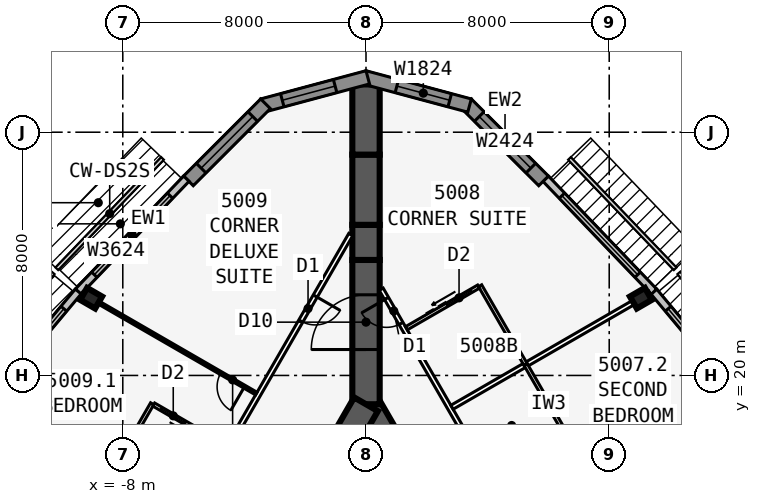
"""IFC4 building model, lengths in metres.
Left out: names, types, materials, properties, quantities, classifications, styles, units other than length and angle.
Written with IfcOpenShell. Run it as: python <this file> out.ifc"""

import sys

from ifc_helpers import new_model, si_unit, direction, frame, frame_2d, origin, origin_2d, place, context, subcontext, project, spatial, polyline, rectangle, i_section, outline, extrude, element, fill, save


model = new_model("IFC4")
c1 = context("Model", 3, precision=1e-05, world=origin(), true_north=direction((0.0, 1.0)))
c2 = subcontext(c1, "Body", "Model", "MODEL_VIEW")
j1 = project(units=[si_unit("LENGTHUNIT", "METRE"), si_unit("PLANEANGLEUNIT", "RADIAN")], contexts=[c1])
p1 = place(None, origin())
s1 = spatial("IfcSite", under=j1, at=p1, CompositionType="ELEMENT")
p2 = place(p1, origin())
s2 = spatial("IfcBuilding", under=s1, at=p2, CompositionType="ELEMENT")
p3 = place(p2, frame((0.0, 0.0, 186.1)))
s3 = spatial("IfcBuildingStorey", under=s2, at=p3, CompositionType="ELEMENT", Elevation=186.1)
p4 = place(p3, frame((16.5, -9.526, 0.0), z_axis=(0.0, 0.0, 1.0), x_axis=(-0.499999749417, 0.866025548458, 0.0)))
e1 = element("IfcWall", 1, at=p4, inside=s3, PredefinedType="SHEAR", context=c2, shape_type="SweptSolid", body=[
    extrude(rectangle(XDim=33.0, YDim=0.9, at=frame_2d((16.5, 0.0))), origin(), (0.0, 0.0, 1.0), 3.4),
])
p5 = place(p4, frame((14.15, 0.0, 0.0)))
e2 = element("IfcOpeningElement", 2, at=p5, cuts=e1, PredefinedType="OPENING", context=c2, shape_type="SweptSolid", body=[
    extrude(rectangle(XDim=1.8, YDim=2.13, at=frame_2d((0.9, 1.065))), frame((0.0, 0.46, 0.0), z_axis=(0.0, -1.0, 0.0), x_axis=(1.0, 0.0, 0.0)), (0.0, 0.0, 1.0), 0.92),
])
p6 = place(p4, frame((12.6, 0.0, 0.0)))
e3 = element("IfcOpeningElement", 3, at=p6, cuts=e1, PredefinedType="OPENING", context=c2, shape_type="SweptSolid", body=[
    extrude(rectangle(XDim=1.0, YDim=2.13, at=frame_2d((0.5, 1.065))), frame((0.0, 0.46, 0.0), z_axis=(0.0, -1.0, 0.0), x_axis=(1.0, 0.0, 0.0)), (0.0, 0.0, 1.0), 0.92),
])
p7 = place(p3, frame((0.0, 19.052, 0.0), z_axis=(0.0, 0.0, 1.0), x_axis=(-0.499999749417, -0.866025548458, 0.0)))
e4 = element("IfcWall", 4, at=p7, inside=s3, PredefinedType="SHEAR", context=c2, shape_type="SweptSolid", body=[
    extrude(rectangle(XDim=33.0, YDim=0.9, at=frame_2d((16.5, 0.0))), origin(), (0.0, 0.0, 1.0), 3.4),
])
p8 = place(p7, frame((14.15, 0.0, 0.0)))
e5 = element("IfcOpeningElement", 5, at=p8, cuts=e4, PredefinedType="OPENING", context=c2, shape_type="SweptSolid", body=[
    extrude(rectangle(XDim=1.8, YDim=2.13, at=frame_2d((0.9, 1.065))), frame((0.0, 0.46, 0.0), z_axis=(0.0, -1.0, 0.0), x_axis=(1.0, 0.0, 0.0)), (0.0, 0.0, 1.0), 0.92),
])
p9 = place(p7, frame((12.6, 0.0, 0.0)))
e6 = element("IfcOpeningElement", 6, at=p9, cuts=e4, PredefinedType="OPENING", context=c2, shape_type="SweptSolid", body=[
    extrude(rectangle(XDim=1.0, YDim=2.13, at=frame_2d((0.5, 1.065))), frame((0.0, 0.46, 0.0), z_axis=(0.0, -1.0, 0.0), x_axis=(1.0, 0.0, 0.0)), (0.0, 0.0, 1.0), 0.92),
])
p10 = place(p3, frame((0.0, 19.052, 0.0), z_axis=(0.0, 0.0, 1.0), x_axis=(0.0, 1.0, 0.0)))
e7 = element("IfcWall", 7, at=p10, inside=s3, PredefinedType="SHEAR", context=c2, shape_type="SweptSolid", body=[
    extrude(rectangle(XDim=4.746, YDim=0.9, at=frame_2d((2.373, 0.0))), origin(), (0.0, 0.0, 1.0), 3.4),
])
p11 = place(p10, frame((1.8, 0.0, 0.0)))
e8 = element("IfcOpeningElement", 8, at=p11, cuts=e7, PredefinedType="OPENING", context=c2, shape_type="SweptSolid", body=[
    extrude(rectangle(XDim=1.8, YDim=2.13, at=frame_2d((0.9, 1.065))), frame((0.0, 0.46, 0.0), z_axis=(0.0, -1.0, 0.0), x_axis=(1.0, 0.0, 0.0)), (0.0, 0.0, 1.0), 0.92),
])
p12 = place(p3, frame((0.0, 23.799, 0.0), z_axis=(0.0, 0.0, 1.0), x_axis=(0.0, 1.0, 0.0)))
e9 = element("IfcWall", 9, at=p12, inside=s3, PredefinedType="SHEAR", context=c2, shape_type="SweptSolid", body=[
    extrude(rectangle(XDim=1.155, YDim=0.9, at=frame_2d((0.577, 0.0))), origin(), (0.0, 0.0, 1.0), 3.4),
])
p13 = place(p3, frame((0.0, 24.953, 0.0), z_axis=(0.0, 0.0, 1.0), x_axis=(0.0, 1.0, 0.0)))
e10 = element("IfcWall", 10, at=p13, inside=s3, PredefinedType="SHEAR", context=c2, shape_type="SweptSolid", body=[
    extrude(rectangle(XDim=2.309, YDim=0.9, at=frame_2d((1.155, 0.0))), origin(), (0.0, 0.0, 1.0), 3.4),
])
p14 = place(p3, frame((0.0, 27.263, 0.0), z_axis=(0.0, 0.0, 1.0), x_axis=(0.0, 1.0, 0.0)))
e11 = element("IfcWall", 11, at=p14, inside=s3, PredefinedType="SHEAR", context=c2, shape_type="SweptSolid", body=[
    extrude(rectangle(XDim=2.31, YDim=0.9, at=frame_2d((1.155, 0.0))), origin(), (0.0, 0.0, 1.0), 3.4),
])
for number, where, z_axis, x_axis in (
    (12, (9.041, 22.541, 0.0), (0.0, 0.0, 1.0), (-0.5, 0.866, 0.0)),
    (13, (-9.041, 22.541, 0.0), (0.0, 0.0, 1.0), (-0.5, -0.866, 0.0)),
):
    element("IfcColumn", number, at=place(p3, frame(where, z_axis=z_axis, x_axis=x_axis)), inside=s3, PredefinedType="COLUMN", context=c2, shape_type="SweptSolid", body=[
        extrude(i_section(OverallWidth=0.455, OverallDepth=0.569, WebThickness=0.078, FlangeThickness=0.125, at=origin_2d()), origin(), (0.0, 0.0, 1.0), 3.4),
    ])
p15 = place(p3, frame((12.723, 18.868, 0.0), z_axis=(0.0, 0.0, 1.0), x_axis=(-0.641810386606, 0.766863369607, 0.0)))
e14 = element("IfcWall", 14, at=p15, inside=s3, PredefinedType="STANDARD", context=c2, shape_type="SweptSolid", body=[
    extrude(rectangle(XDim=5.076, YDim=0.25, at=frame_2d((2.538, 0.0))), origin(), (0.0, 0.0, 1.0), 3.15),
])
p16 = place(p15, frame((0.738, 0.0, 0.45)))
e15 = element("IfcOpeningElement", 15, at=p16, cuts=e14, PredefinedType="OPENING", context=c2, shape_type="SweptSolid", body=[
    extrude(rectangle(XDim=3.6, YDim=2.4, at=frame_2d((1.8, 1.2))), frame((0.0, 0.135, 0.0), z_axis=(0.0, -1.0, 0.0), x_axis=(1.0, 0.0, 0.0)), (0.0, 0.0, 1.0), 0.27),
])
p17 = place(p3, frame((9.471, 22.754, 0.0), z_axis=(0.0, 0.0, 1.0), x_axis=(-0.691719937936, 0.722165858693, 0.0)))
e16 = element("IfcWall", 16, at=p17, inside=s3, PredefinedType="STANDARD", context=c2, shape_type="SweptSolid", body=[
    extrude(rectangle(XDim=5.148, YDim=0.25, at=frame_2d((2.574, 0.0))), origin(), (0.0, 0.0, 1.0), 3.15),
])
p18 = place(p17, frame((0.774, 0.0, 0.45)))
e17 = element("IfcOpeningElement", 17, at=p18, cuts=e16, PredefinedType="OPENING", context=c2, shape_type="SweptSolid", body=[
    extrude(rectangle(XDim=3.6, YDim=2.4, at=frame_2d((1.8, 1.2))), frame((0.0, 0.135, 0.0), z_axis=(0.0, -1.0, 0.0), x_axis=(1.0, 0.0, 0.0)), (0.0, 0.0, 1.0), 0.27),
])
p19 = place(p3, frame((5.841, 26.399, 0.0), z_axis=(0.0, 0.0, 1.0), x_axis=(-0.707106781187, 0.707106781187, 0.0)))
e18 = element("IfcWall", 18, at=p19, inside=s3, PredefinedType="SOLIDWALL", context=c2, shape_type="SweptSolid", body=[
    extrude(rectangle(XDim=3.586, YDim=0.45, at=frame_2d((1.793, 0.0))), origin(), (0.0, 0.0, 1.0), 3.15),
])
p20 = place(p19, frame((0.593, 0.0, 0.45)))
e19 = element("IfcOpeningElement", 19, at=p20, cuts=e18, PredefinedType="OPENING", context=c2, shape_type="SweptSolid", body=[
    extrude(rectangle(XDim=2.4, YDim=2.4, at=frame_2d((1.2, 1.2))), frame((0.0, 0.235, 0.0), z_axis=(0.0, -1.0, 0.0), x_axis=(1.0, 0.0, 0.0)), (0.0, 0.0, 1.0), 0.47),
])
p21 = place(p3, frame((3.406, 28.877, 0.0), z_axis=(0.0, 0.0, 1.0), x_axis=(-0.965924653531, 0.258823421857, 0.0)))
e20 = element("IfcWall", 20, at=p21, inside=s3, PredefinedType="SOLIDWALL", context=c2, shape_type="SweptSolid", body=[
    extrude(outline(polyline([(3.586, 0.225), (3.527, 0.225), (3.035, 0.093), (3.0, 0.225), (0.0, 0.225), (0.0, -0.225), (3.586, -0.225), (3.586, 0.225)])), origin(), (0.0, 0.0, 1.0), 3.15),
])
p22 = place(p21, frame((0.675, 0.0, 0.45)))
e21 = element("IfcOpeningElement", 21, at=p22, cuts=e20, PredefinedType="OPENING", context=c2, shape_type="SweptSolid", body=[
    extrude(rectangle(XDim=1.8, YDim=2.4, at=frame_2d((0.9, 1.2))), frame((0.0, 0.235, 0.0), z_axis=(0.0, -1.0, 0.0), x_axis=(1.0, 0.0, 0.0)), (0.0, 0.0, 1.0), 0.47),
])
p23 = place(p3, frame((0.058, 29.805, 0.0), z_axis=(0.0, 0.0, 1.0), x_axis=(-0.965924653531, -0.258823421857, 0.0)))
e22 = element("IfcWall", 22, at=p23, inside=s3, PredefinedType="SOLIDWALL", context=c2, shape_type="SweptSolid", body=[
    extrude(outline(polyline([(3.586, 0.225), (0.586, 0.225), (0.551, 0.093), (0.06, 0.225), (0.0, 0.225), (0.0, -0.225), (3.586, -0.225), (3.586, 0.225)])), origin(), (0.0, 0.0, 1.0), 3.15),
])
p24 = place(p23, frame((1.111, 0.0, 0.45)))
e23 = element("IfcOpeningElement", 23, at=p24, cuts=e22, PredefinedType="OPENING", context=c2, shape_type="SweptSolid", body=[
    extrude(rectangle(XDim=1.8, YDim=2.4, at=frame_2d((0.9, 1.2))), frame((0.0, 0.235, 0.0), z_axis=(0.0, -1.0, 0.0), x_axis=(1.0, 0.0, 0.0)), (0.0, 0.0, 1.0), 0.47),
])
p25 = place(p3, frame((-3.305, 28.935, 0.0), z_axis=(0.0, 0.0, 1.0), x_axis=(-0.707106781187, -0.707106781187, 0.0)))
e24 = element("IfcWall", 24, at=p25, inside=s3, PredefinedType="SOLIDWALL", context=c2, shape_type="SweptSolid", body=[
    extrude(rectangle(XDim=3.586, YDim=0.45, at=frame_2d((1.793, 0.0))), origin(), (0.0, 0.0, 1.0), 3.15),
])
p26 = place(p25, frame((0.593, 0.0, 0.45)))
e25 = element("IfcOpeningElement", 25, at=p26, cuts=e24, PredefinedType="OPENING", context=c2, shape_type="SweptSolid", body=[
    extrude(rectangle(XDim=2.4, YDim=2.4, at=frame_2d((1.2, 1.2))), frame((0.0, 0.235, 0.0), z_axis=(0.0, -1.0, 0.0), x_axis=(1.0, 0.0, 0.0)), (0.0, 0.0, 1.0), 0.47),
])
p27 = place(p3, frame((-5.91, 26.472, 0.0), z_axis=(0.0, 0.0, 1.0), x_axis=(-0.691719937936, -0.722165858693, 0.0)))
e26 = element("IfcWall", 26, at=p27, inside=s3, PredefinedType="STANDARD", context=c2, shape_type="SweptSolid", body=[
    extrude(rectangle(XDim=5.148, YDim=0.25, at=frame_2d((2.574, 0.0))), origin(), (0.0, 0.0, 1.0), 3.15),
])
p28 = place(p27, frame((0.774, 0.0, 0.45)))
e27 = element("IfcOpeningElement", 27, at=p28, cuts=e26, PredefinedType="OPENING", context=c2, shape_type="SweptSolid", body=[
    extrude(rectangle(XDim=3.6, YDim=2.4, at=frame_2d((1.8, 1.2))), frame((0.0, 0.135, 0.0), z_axis=(0.0, -1.0, 0.0), x_axis=(1.0, 0.0, 0.0)), (0.0, 0.0, 1.0), 0.27),
])
p29 = place(p3, frame((-9.465, 22.76, 0.0), z_axis=(0.0, 0.0, 1.0), x_axis=(-0.641810386606, -0.766863369607, 0.0)))
e28 = element("IfcWall", 28, at=p29, inside=s3, PredefinedType="STANDARD", context=c2, shape_type="SweptSolid", body=[
    extrude(rectangle(XDim=5.076, YDim=0.25, at=frame_2d((2.538, 0.0))), origin(), (0.0, 0.0, 1.0), 3.15),
])
p30 = place(p29, frame((0.738, 0.0, 0.45)))
e29 = element("IfcOpeningElement", 29, at=p30, cuts=e28, PredefinedType="OPENING", context=c2, shape_type="SweptSolid", body=[
    extrude(rectangle(XDim=3.6, YDim=2.4, at=frame_2d((1.8, 1.2))), frame((0.0, 0.135, 0.0), z_axis=(0.0, -1.0, 0.0), x_axis=(1.0, 0.0, 0.0)), (0.0, 0.0, 1.0), 0.27),
])
p31 = place(p3, frame((20.027, -10.985, 0.0), z_axis=(0.0, 0.0, 1.0), x_axis=(-0.500001677587, 0.866024435227, 0.0)))
e30 = element("IfcWall", 30, at=p31, inside=s3, PredefinedType="PARTITIONING", context=c2, shape_type="SweptSolid", body=[
    extrude(rectangle(XDim=39.054, YDim=0.15, at=frame_2d((19.527, 0.0))), origin(), (0.0, 0.0, 1.0), 3.15),
])
p32 = place(p31, frame((1.558, 0.0, 0.0)))
e31 = element("IfcOpeningElement", 31, at=p32, cuts=e30, PredefinedType="OPENING", context=c2, shape_type="SweptSolid", body=[
    extrude(rectangle(XDim=0.95, YDim=2.13, at=frame_2d((0.475, 1.065))), frame((0.0, 0.085, 0.0), z_axis=(0.0, -1.0, 0.0), x_axis=(1.0, 0.0, 0.0)), (0.0, 0.0, 1.0), 0.17),
])
p33 = place(p31, frame((12.752, 0.0, 0.0)))
e32 = element("IfcOpeningElement", 32, at=p33, cuts=e30, PredefinedType="OPENING", context=c2, shape_type="SweptSolid", body=[
    extrude(rectangle(XDim=0.95, YDim=2.13, at=frame_2d((0.475, 1.065))), frame((0.0, 0.085, 0.0), z_axis=(0.0, -1.0, 0.0), x_axis=(1.0, 0.0, 0.0)), (0.0, 0.0, 1.0), 0.17),
])
p34 = place(p31, frame((26.552, 0.0, 0.0)))
e33 = element("IfcOpeningElement", 33, at=p34, cuts=e30, PredefinedType="OPENING", context=c2, shape_type="SweptSolid", body=[
    extrude(rectangle(XDim=0.95, YDim=2.13, at=frame_2d((0.475, 1.065))), frame((0.0, 0.085, 0.0), z_axis=(0.0, -1.0, 0.0), x_axis=(1.0, 0.0, 0.0)), (0.0, 0.0, 1.0), 0.17),
])
p35 = place(p31, frame((37.752, 0.0, 0.0)))
e34 = element("IfcOpeningElement", 34, at=p35, cuts=e30, PredefinedType="OPENING", context=c2, shape_type="SweptSolid", body=[
    extrude(rectangle(XDim=0.95, YDim=2.13, at=frame_2d((0.475, 1.065))), frame((0.0, 0.085, 0.0), z_axis=(0.0, -1.0, 0.0), x_axis=(1.0, 0.0, 0.0)), (0.0, 0.0, 1.0), 0.17),
])
p36 = place(p3, frame((5.329, 14.623, 0.0), z_axis=(0.0, 0.0, 1.0), x_axis=(0.866011723728, 0.500023693804, 0.0)))
e35 = element("IfcWall", 35, at=p36, inside=s3, PredefinedType="PARTITIONING", context=c2, shape_type="SweptSolid", body=[
    extrude(rectangle(XDim=8.395, YDim=0.1, at=frame_2d((4.198, 0.0))), origin(), (0.0, 0.0, 1.0), 2.108),
])
p37 = place(p36, frame((0.45, 0.0, 0.0)))
e36 = element("IfcOpeningElement", 36, at=p37, cuts=e35, PredefinedType="OPENING", context=c2, shape_type="SweptSolid", body=[
    extrude(rectangle(XDim=0.9, YDim=2.032, at=frame_2d((0.45, 1.016))), frame((0.0, 0.06, 0.0), z_axis=(0.0, -1.0, 0.0), x_axis=(1.0, 0.0, 0.0)), (0.0, 0.0, 1.0), 0.12),
])
p38 = place(p3, frame((2.829, 18.954, 0.0), z_axis=(0.0, 0.0, 1.0), x_axis=(0.866015739374, 0.500016738876, 0.0)))
e37 = element("IfcWall", 37, at=p38, inside=s3, PredefinedType="PARTITIONING", context=c2, shape_type="SweptSolid", body=[
    extrude(rectangle(XDim=7.516, YDim=0.15, at=frame_2d((3.758, 0.0))), origin(), (0.0, 0.0, 1.0), 2.05),
])
for number, where, z_axis, x_axis in (
    (38, (6.753, 17.755, 0.0), (0.0, 0.0, 1.0), (-0.5, 0.866, 0.0)),
    (39, (5.253, 20.354, 0.0), (0.0, 0.0, 1.0), (-0.5, 0.866, 0.0)),
):
    element("IfcWall", number, at=place(p3, frame(where, z_axis=z_axis, x_axis=x_axis)), inside=s3, PredefinedType="PLUMBINGWALL", context=c2, shape_type="SweptSolid", body=[
        extrude(rectangle(XDim=3.0, YDim=0.12, at=frame_2d((1.5, 0.0))), origin(), (0.0, 0.0, 1.0), 3.15),
    ])
p39 = place(p3, frame((1.329, 21.552, 0.0), z_axis=(0.0, 0.0, 1.0), x_axis=(0.865997131366, 0.500048966069, 0.0)))
e40 = element("IfcWall", 40, at=p39, inside=s3, PredefinedType="PLUMBINGWALL", context=c2, shape_type="SweptSolid", body=[
    extrude(rectangle(XDim=2.74, YDim=0.12, at=frame_2d((1.37, 0.0))), origin(), (0.0, 0.0, 1.0), 3.15),
])
p40 = place(p39, frame((1.55, 0.0, 0.0)))
e41 = element("IfcOpeningElement", 41, at=p40, cuts=e40, PredefinedType="OPENING", context=c2, shape_type="SweptSolid", body=[
    extrude(rectangle(XDim=0.9, YDim=2.13, at=frame_2d((0.45, 1.065))), frame((0.0, 0.07, 0.0), z_axis=(0.0, -1.0, 0.0), x_axis=(1.0, 0.0, 0.0)), (0.0, 0.0, 1.0), 0.14),
])
p41 = place(p3, frame((-0.5, 24.636, 0.0), z_axis=(0.0, 0.0, 1.0), x_axis=(-0.500001915564, -0.86602429783, 0.0)))
e42 = element("IfcWall", 42, at=p41, inside=s3, PredefinedType="PARTITIONING", context=c2, shape_type="SweptSolid", body=[
    extrude(rectangle(XDim=42.172, YDim=0.15, at=frame_2d((21.086, 0.0))), origin(), (0.0, 0.0, 1.0), 3.15),
])
p42 = place(p41, frame((2.338, 0.0, 0.0)))
e43 = element("IfcOpeningElement", 43, at=p42, cuts=e42, PredefinedType="OPENING", context=c2, shape_type="SweptSolid", body=[
    extrude(rectangle(XDim=0.95, YDim=2.13, at=frame_2d((0.475, 1.065))), frame((0.0, 0.085, 0.0), z_axis=(0.0, -1.0, 0.0), x_axis=(1.0, 0.0, 0.0)), (0.0, 0.0, 1.0), 0.17),
])
p43 = place(p41, frame((18.111, 0.0, 0.0)))
e44 = element("IfcOpeningElement", 44, at=p43, cuts=e42, PredefinedType="OPENING", context=c2, shape_type="SweptSolid", body=[
    extrude(rectangle(XDim=0.95, YDim=2.13, at=frame_2d((0.475, 1.065))), frame((0.0, 0.085, 0.0), z_axis=(0.0, -1.0, 0.0), x_axis=(1.0, 0.0, 0.0)), (0.0, 0.0, 1.0), 0.17),
])
p44 = place(p41, frame((28.111, 0.0, 0.0)))
e45 = element("IfcOpeningElement", 45, at=p44, cuts=e42, PredefinedType="OPENING", context=c2, shape_type="SweptSolid", body=[
    extrude(rectangle(XDim=0.95, YDim=2.13, at=frame_2d((0.475, 1.065))), frame((0.0, 0.085, 0.0), z_axis=(0.0, -1.0, 0.0), x_axis=(1.0, 0.0, 0.0)), (0.0, 0.0, 1.0), 0.17),
])
p45 = place(p41, frame((39.311, 0.0, 0.0)))
e46 = element("IfcOpeningElement", 46, at=p45, cuts=e42, PredefinedType="OPENING", context=c2, shape_type="SweptSolid", body=[
    extrude(rectangle(XDim=0.95, YDim=2.13, at=frame_2d((0.475, 1.065))), frame((0.0, 0.085, 0.0), z_axis=(0.0, -1.0, 0.0), x_axis=(1.0, 0.0, 0.0)), (0.0, 0.0, 1.0), 0.17),
])
p46 = place(p3, frame((-3.608, 19.404, 0.0), z_axis=(0.0, 0.0, 1.0), x_axis=(-0.866015989873, 0.500016305018, 0.0)))
e47 = element("IfcWall", 47, at=p46, inside=s3, PredefinedType="PARTITIONING", context=c2, shape_type="SweptSolid", body=[
    extrude(rectangle(XDim=6.616, YDim=0.1, at=frame_2d((3.308, 0.0))), origin(), (0.0, 0.0, 1.0), 2.05),
])
p47 = place(p46, frame((0.45, 0.0, 0.0)))
e48 = element("IfcOpeningElement", 48, at=p47, cuts=e47, PredefinedType="OPENING", context=c2, shape_type="SweptSolid", body=[
    extrude(rectangle(XDim=0.9, YDim=2.032, at=frame_2d((0.45, 1.016))), frame((0.0, 0.06, 0.0), z_axis=(0.0, -1.0, 0.0), x_axis=(1.0, 0.0, 0.0)), (0.0, 0.0, 1.0), 0.12),
])
p48 = place(p3, frame((-6.108, 15.073, 0.0), z_axis=(0.0, 0.0, 1.0), x_axis=(-0.866025567496, 0.499999716443, 0.0)))
e49 = element("IfcWall", 49, at=p48, inside=s3, PredefinedType="PARTITIONING", context=c2, shape_type="SweptSolid", body=[
    extrude(rectangle(XDim=7.495, YDim=0.15, at=frame_2d((3.748, 0.0))), origin(), (0.0, 0.0, 1.0), 2.108),
])
p49 = place(p3, frame((-7.033, 19.072, 0.0), z_axis=(0.0, 0.0, 1.0), x_axis=(-0.499990139034, -0.866031096941, 0.0)))
e50 = element("IfcWall", 50, at=p49, inside=s3, PredefinedType="PLUMBINGWALL", context=c2, shape_type="SweptSolid", body=[
    extrude(rectangle(XDim=3.0, YDim=0.12, at=frame_2d((1.5, 0.0))), origin(), (0.0, 0.0, 1.0), 3.15),
])
p50 = place(p3, frame((-4.608, 17.671, 0.0), z_axis=(0.0, 0.0, 1.0), x_axis=(-0.865997131366, 0.500048966069, 0.0)))
e51 = element("IfcWall", 51, at=p50, inside=s3, PredefinedType="PLUMBINGWALL", context=c2, shape_type="SweptSolid", body=[
    extrude(rectangle(XDim=2.74, YDim=0.12, at=frame_2d((1.37, 0.0))), origin(), (0.0, 0.0, 1.0), 3.15),
])
p51 = place(p50, frame((1.55, 0.0, 0.0)))
e52 = element("IfcOpeningElement", 52, at=p51, cuts=e51, PredefinedType="OPENING", context=c2, shape_type="SweptSolid", body=[
    extrude(rectangle(XDim=0.9, YDim=2.13, at=frame_2d((0.45, 1.065))), frame((0.0, 0.07, 0.0), z_axis=(0.0, -1.0, 0.0), x_axis=(1.0, 0.0, 0.0)), (0.0, 0.0, 1.0), 0.14),
])
p52 = place(p16, origin())
e53 = element("IfcWindow", 53, at=p52, inside=s3, PartitioningType="SINGLE_PANEL", PredefinedType="WINDOW", context=c2, shape_type="SweptSolid", body=[
    extrude(rectangle(XDim=3.6, YDim=2.4, at=frame_2d((1.8, 1.2))), frame((0.0, 0.03, 0.0), z_axis=(0.0, -1.0, 0.0), x_axis=(1.0, 0.0, 0.0)), (0.0, 0.0, 1.0), 0.06),
])
fill(e15, e53)
p53 = place(p18, origin())
e54 = element("IfcWindow", 54, at=p53, inside=s3, PartitioningType="SINGLE_PANEL", PredefinedType="WINDOW", context=c2, shape_type="SweptSolid", body=[
    extrude(rectangle(XDim=3.6, YDim=2.4, at=frame_2d((1.8, 1.2))), frame((0.0, 0.03, 0.0), z_axis=(0.0, -1.0, 0.0), x_axis=(1.0, 0.0, 0.0)), (0.0, 0.0, 1.0), 0.06),
])
fill(e17, e54)
p54 = place(p20, origin())
e55 = element("IfcWindow", 55, at=p54, inside=s3, PartitioningType="SINGLE_PANEL", PredefinedType="WINDOW", context=c2, shape_type="SweptSolid", body=[
    extrude(rectangle(XDim=2.4, YDim=2.4, at=frame_2d((1.2, 1.2))), frame((0.0, 0.03, 0.0), z_axis=(0.0, -1.0, 0.0), x_axis=(1.0, 0.0, 0.0)), (0.0, 0.0, 1.0), 0.06),
])
fill(e19, e55)
p55 = place(p22, origin())
e56 = element("IfcWindow", 56, at=p55, inside=s3, PartitioningType="SINGLE_PANEL", PredefinedType="WINDOW", context=c2, shape_type="SweptSolid", body=[
    extrude(rectangle(XDim=1.8, YDim=2.4, at=frame_2d((0.9, 1.2))), frame((0.0, 0.03, 0.0), z_axis=(0.0, -1.0, 0.0), x_axis=(1.0, 0.0, 0.0)), (0.0, 0.0, 1.0), 0.06),
])
fill(e21, e56)
p56 = place(p24, origin())
e57 = element("IfcWindow", 57, at=p56, inside=s3, PartitioningType="SINGLE_PANEL", PredefinedType="WINDOW", context=c2, shape_type="SweptSolid", body=[
    extrude(rectangle(XDim=1.8, YDim=2.4, at=frame_2d((0.9, 1.2))), frame((0.0, 0.03, 0.0), z_axis=(0.0, -1.0, 0.0), x_axis=(1.0, 0.0, 0.0)), (0.0, 0.0, 1.0), 0.06),
])
fill(e23, e57)
p57 = place(p26, origin())
e58 = element("IfcWindow", 58, at=p57, inside=s3, PartitioningType="SINGLE_PANEL", PredefinedType="WINDOW", context=c2, shape_type="SweptSolid", body=[
    extrude(rectangle(XDim=2.4, YDim=2.4, at=frame_2d((1.2, 1.2))), frame((0.0, 0.03, 0.0), z_axis=(0.0, -1.0, 0.0), x_axis=(1.0, 0.0, 0.0)), (0.0, 0.0, 1.0), 0.06),
])
fill(e25, e58)
p58 = place(p28, origin())
e59 = element("IfcWindow", 59, at=p58, inside=s3, PartitioningType="SINGLE_PANEL", PredefinedType="WINDOW", context=c2, shape_type="SweptSolid", body=[
    extrude(rectangle(XDim=3.6, YDim=2.4, at=frame_2d((1.8, 1.2))), frame((0.0, 0.03, 0.0), z_axis=(0.0, -1.0, 0.0), x_axis=(1.0, 0.0, 0.0)), (0.0, 0.0, 1.0), 0.06),
])
fill(e27, e59)
p59 = place(p30, origin())
e60 = element("IfcWindow", 60, at=p59, inside=s3, PartitioningType="SINGLE_PANEL", PredefinedType="WINDOW", context=c2, shape_type="SweptSolid", body=[
    extrude(rectangle(XDim=3.6, YDim=2.4, at=frame_2d((1.8, 1.2))), frame((0.0, 0.03, 0.0), z_axis=(0.0, -1.0, 0.0), x_axis=(1.0, 0.0, 0.0)), (0.0, 0.0, 1.0), 0.06),
])
fill(e29, e60)
p60 = place(p40, origin())
e61 = element("IfcDoor", 61, at=p60, inside=s3, OperationType="SLIDING_TO_LEFT", PredefinedType="DOOR", context=c2, shape_type="SweptSolid", body=[
    extrude(rectangle(XDim=0.9, YDim=2.13, at=frame_2d((0.45, 1.065))), frame((0.0, 0.025, 0.0), z_axis=(0.0, -1.0, 0.0), x_axis=(1.0, 0.0, 0.0)), (0.0, 0.0, 1.0), 0.05),
])
fill(e41, e61)
p61 = place(p35, origin())
e62 = element("IfcDoor", 62, at=p61, inside=s3, OperationType="SINGLE_SWING_RIGHT", PredefinedType="DOOR", context=c2, shape_type="SweptSolid", body=[
    extrude(rectangle(XDim=0.95, YDim=2.13, at=frame_2d((0.475, 1.065))), frame((0.0, 0.025, 0.0), z_axis=(0.0, -1.0, 0.0), x_axis=(1.0, 0.0, 0.0)), (0.0, 0.0, 1.0), 0.05),
])
fill(e34, e62)
p62 = place(p47, origin())
e63 = element("IfcDoor", 63, at=p62, inside=s3, OperationType="SINGLE_SWING_LEFT", PredefinedType="DOOR", context=c2, shape_type="SweptSolid", body=[
    extrude(rectangle(XDim=0.9, YDim=2.032, at=frame_2d((0.45, 1.016))), frame((0.0, 0.025, 0.0), z_axis=(0.0, -1.0, 0.0), x_axis=(1.0, 0.0, 0.0)), (0.0, 0.0, 1.0), 0.05),
])
fill(e48, e63)
p63 = place(p42, origin())
e64 = element("IfcDoor", 64, at=p63, inside=s3, OperationType="SINGLE_SWING_LEFT", PredefinedType="DOOR", context=c2, shape_type="SweptSolid", body=[
    extrude(rectangle(XDim=0.95, YDim=2.13, at=frame_2d((0.475, 1.065))), frame((0.0, 0.025, 0.0), z_axis=(0.0, -1.0, 0.0), x_axis=(1.0, 0.0, 0.0)), (0.0, 0.0, 1.0), 0.05),
])
fill(e43, e64)
p64 = place(p51, origin())
e65 = element("IfcDoor", 65, at=p64, inside=s3, OperationType="SLIDING_TO_LEFT", PredefinedType="DOOR", context=c2, shape_type="SweptSolid", body=[
    extrude(rectangle(XDim=0.9, YDim=2.13, at=frame_2d((0.45, 1.065))), frame((0.0, 0.025, 0.0), z_axis=(0.0, -1.0, 0.0), x_axis=(1.0, 0.0, 0.0)), (0.0, 0.0, 1.0), 0.05),
])
fill(e52, e65)
p65 = place(p11, origin())
e66 = element("IfcDoor", 66, at=p65, inside=s3, OperationType="DOUBLE_DOOR_DOUBLE_SWING", PredefinedType="DOOR", context=c2, shape_type="SweptSolid", body=[
    extrude(rectangle(XDim=1.8, YDim=2.13, at=frame_2d((0.9, 1.065))), frame((0.0, 0.025, 0.0), z_axis=(0.0, -1.0, 0.0), x_axis=(1.0, 0.0, 0.0)), (0.0, 0.0, 1.0), 0.05),
])
fill(e8, e66)
save(model, sys.argv[1])
